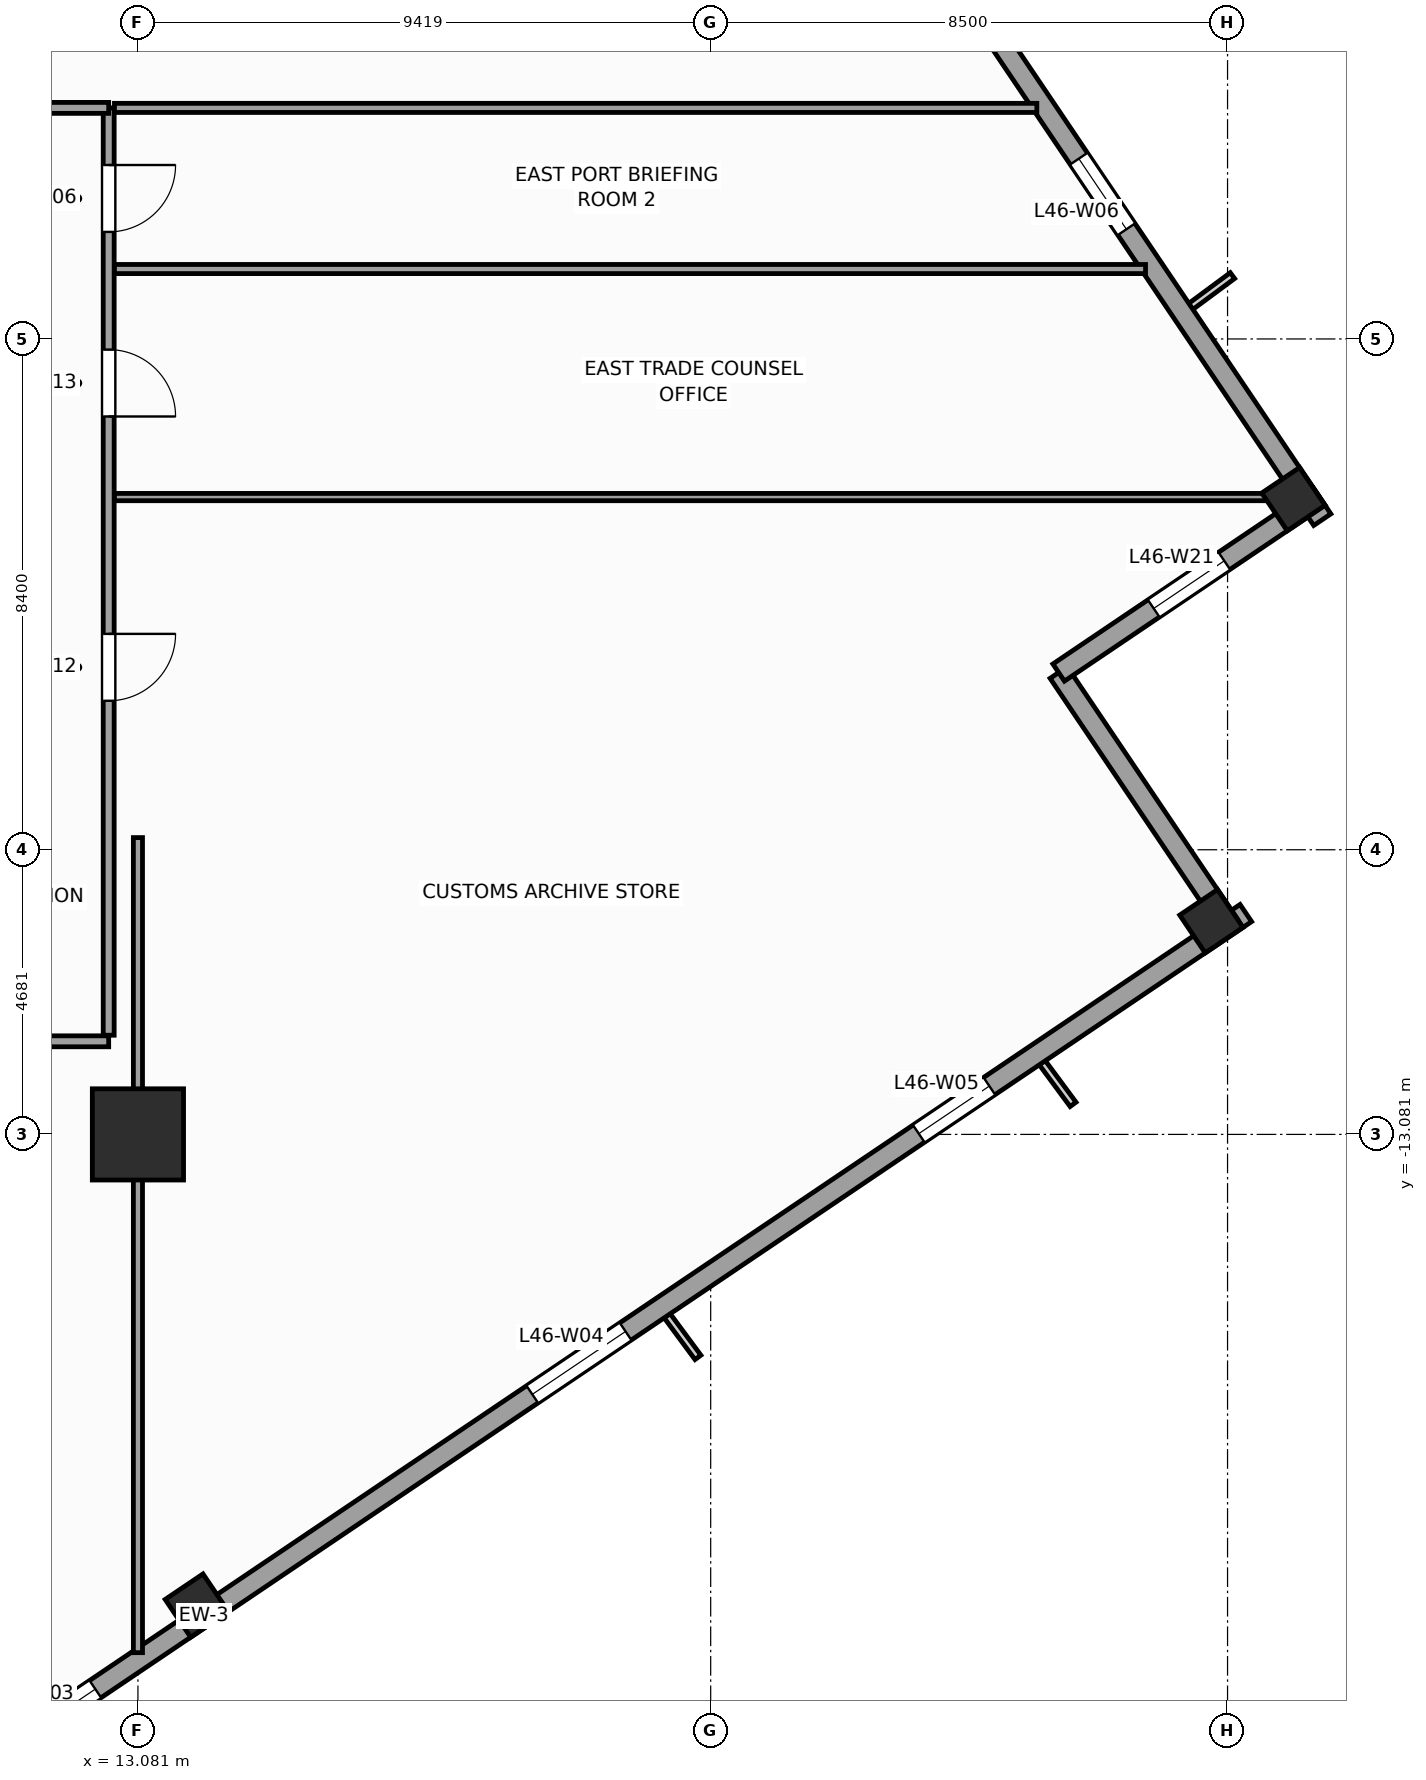
"""IFC4 building model, lengths in metres.
Left out: names, types, materials, properties, quantities, classifications, styles, units other than length and angle.
Written with IfcOpenShell. Run it as: python <this file> out.ifc"""

import sys

from ifc_helpers import new_model, si_unit, direction, frame, frame_2d, origin, origin_2d, place, context, subcontext, project, spatial, rectangle, extrude, source, transform, mapped, element, fill, save


model = new_model("IFC4")
c1 = context("Model", 3, precision=1e-05, world=origin(), true_north=direction((0.0, 1.0)))
c2 = subcontext(c1, "Body", "Model", "MODEL_VIEW")
j1 = project(units=[si_unit("LENGTHUNIT", "METRE"), si_unit("PLANEANGLEUNIT", "RADIAN")], contexts=[c1])
p1 = place(None, origin())
s1 = spatial("IfcSite", under=j1, at=p1, CompositionType="ELEMENT")
p2 = place(p1, origin())
s2 = spatial("IfcBuilding", under=s1, at=p2, CompositionType="ELEMENT")
p3 = place(p2, frame((0.0, 0.0, 192.4)))
s3 = spatial("IfcBuildingStorey", under=s2, at=p3, CompositionType="ELEMENT", Elevation=192.4)
m1 = source(origin(), c2, "Body", "SweptSolid", [
    extrude(rectangle(XDim=1.5, YDim=1.5, at=origin_2d()), origin(), (0.0, 0.0, 1.0), 4.0),
])
p4 = place(p3, frame((13.081, -13.081, 0.0), z_axis=(0.0, 0.0, 1.0), x_axis=(1.0, 0.0, 0.0)))
e1 = element("IfcColumn", 1, at=p4, inside=s3, PredefinedType="COLUMN", context=c2, shape_type="MappedRepresentation", body=[
    mapped(m1, transform((0.0, 0.0, 0.0), scale=1.0)),
])
m2 = source(origin(), c2, "Body", "SweptSolid", [
    extrude(rectangle(XDim=0.75, YDim=0.75, at=origin_2d()), origin(), (0.0, 0.0, 1.0), 4.0),
])
for number, where, z_axis, x_axis in (
    (2, (14.05, -20.83, 0.0), (0.0, 0.0, 1.0), (0.829, 0.559, 0.0)),
    (3, (30.734, -9.576, 0.0), (0.0, 0.0, 1.0), (0.829, 0.559, 0.0)),
    (4, (32.083, -2.635, 0.0), (0.0, 0.0, 1.0), (0.829, 0.559, 0.0)),
):
    element("IfcColumn", number, at=place(p3, frame(where, z_axis=z_axis, x_axis=x_axis)), inside=s3, PredefinedType="COLUMN", context=c2, shape_type="MappedRepresentation", body=[
        mapped(m2, transform((0.0, 0.0, 0.0), scale=1.0)),
    ])
p5 = place(p3, frame((-2.972, -32.558, 0.0), z_axis=(0.0, 0.0, 1.0), x_axis=(0.829036218961, 0.559194910251, 0.0)))
e5 = element("IfcWall", 5, at=p5, inside=s3, PredefinedType="STANDARD", context=c2, shape_type="SweptSolid", body=[
    extrude(rectangle(XDim=41.34, YDim=0.34, at=frame_2d((20.67, 0.0))), origin(), (0.0, 0.0, 1.0), 3.04),
])
p6 = place(p5, frame((4.261, 0.0, 0.56)))
e6 = element("IfcOpeningElement", 6, at=p6, cuts=e5, PredefinedType="OPENING", context=c2, shape_type="SweptSolid", body=[
    extrude(rectangle(XDim=1.4, YDim=2.4, at=frame_2d((0.7, 1.2))), frame((0.0, 0.18, 0.0), z_axis=(0.0, -1.0, 0.0), x_axis=(1.0, 0.0, 0.0)), (0.0, 0.0, 1.0), 0.36),
])
p7 = place(p5, frame((11.064, 0.0, 0.61)))
e7 = element("IfcOpeningElement", 7, at=p7, cuts=e5, PredefinedType="OPENING", context=c2, shape_type="SweptSolid", body=[
    extrude(rectangle(XDim=1.85, YDim=2.35, at=frame_2d((0.925, 1.175))), frame((0.0, 0.18, 0.0), z_axis=(0.0, -1.0, 0.0), x_axis=(1.0, 0.0, 0.0)), (0.0, 0.0, 1.0), 0.36),
])
p8 = place(p5, frame((16.668, 0.0, 0.61)))
e8 = element("IfcOpeningElement", 8, at=p8, cuts=e5, PredefinedType="OPENING", context=c2, shape_type="SweptSolid", body=[
    extrude(rectangle(XDim=1.85, YDim=2.35, at=frame_2d((0.925, 1.175))), frame((0.0, 0.18, 0.0), z_axis=(0.0, -1.0, 0.0), x_axis=(1.0, 0.0, 0.0)), (0.0, 0.0, 1.0), 0.36),
])
p9 = place(p5, frame((27.186, 0.0, 0.61)))
e9 = element("IfcOpeningElement", 9, at=p9, cuts=e5, PredefinedType="OPENING", context=c2, shape_type="SweptSolid", body=[
    extrude(rectangle(XDim=1.85, YDim=2.35, at=frame_2d((0.925, 1.175))), frame((0.0, 0.18, 0.0), z_axis=(0.0, -1.0, 0.0), x_axis=(1.0, 0.0, 0.0)), (0.0, 0.0, 1.0), 0.36),
])
p10 = place(p5, frame((34.852, 0.0, 0.56)))
e10 = element("IfcOpeningElement", 10, at=p10, cuts=e5, PredefinedType="OPENING", context=c2, shape_type="SweptSolid", body=[
    extrude(rectangle(XDim=1.4, YDim=2.4, at=frame_2d((0.7, 1.2))), frame((0.0, 0.18, 0.0), z_axis=(0.0, -1.0, 0.0), x_axis=(1.0, 0.0, 0.0)), (0.0, 0.0, 1.0), 0.36),
])
p11 = place(p3, frame((31.019, -9.631, 0.0), z_axis=(0.0, 0.0, 1.0), x_axis=(-0.559210350234, 0.829025804298, 0.0)))
e11 = element("IfcWall", 11, at=p11, inside=s3, PredefinedType="STANDARD", context=c2, shape_type="SweptSolid", body=[
    extrude(rectangle(XDim=5.0, YDim=0.34, at=frame_2d((2.5, 0.0))), origin(), (0.0, 0.0, 1.0), 3.74),
])
p12 = place(p3, frame((28.223, -5.486, 0.0), z_axis=(0.0, 0.0, 1.0), x_axis=(0.82905227345, 0.559171107879, 0.0)))
e12 = element("IfcWall", 12, at=p12, inside=s3, PredefinedType="STANDARD", context=c2, shape_type="SweptSolid", body=[
    extrude(rectangle(XDim=5.17, YDim=0.34, at=frame_2d((2.585, 0.0))), origin(), (0.0, 0.0, 1.0), 3.04),
])
p13 = place(p12, frame((1.885, 0.0, 0.56)))
e13 = element("IfcOpeningElement", 13, at=p13, cuts=e12, PredefinedType="OPENING", context=c2, shape_type="SweptSolid", body=[
    extrude(rectangle(XDim=1.4, YDim=2.4, at=frame_2d((0.7, 1.2))), frame((0.0, 0.18, 0.0), z_axis=(0.0, -1.0, 0.0), x_axis=(1.0, 0.0, 0.0)), (0.0, 0.0, 1.0), 0.36),
])
p14 = place(p3, frame((32.558, -2.972, 0.0), z_axis=(0.0, 0.0, 1.0), x_axis=(-0.559194910251, 0.829036218961, 0.0)))
e14 = element("IfcWall", 14, at=p14, inside=s3, PredefinedType="STANDARD", context=c2, shape_type="SweptSolid", body=[
    extrude(rectangle(XDim=41.34, YDim=0.34, at=frame_2d((20.67, 0.0))), origin(), (0.0, 0.0, 1.0), 3.04),
])
p15 = place(p14, frame((25.745, 0.0, 0.0)))
e15 = element("IfcOpeningElement", 15, at=p15, cuts=e14, PredefinedType="OPENING", context=c2, shape_type="SweptSolid", body=[
    extrude(rectangle(XDim=1.05, YDim=2.25, at=frame_2d((0.525, 1.125))), frame((0.0, 0.18, 0.0), z_axis=(0.0, -1.0, 0.0), x_axis=(1.0, 0.0, 0.0)), (0.0, 0.0, 1.0), 0.36),
])
p16 = place(p14, frame((5.761, 0.0, 0.56)))
e16 = element("IfcOpeningElement", 16, at=p16, cuts=e14, PredefinedType="OPENING", context=c2, shape_type="SweptSolid", body=[
    extrude(rectangle(XDim=1.4, YDim=2.4, at=frame_2d((0.7, 1.2))), frame((0.0, 0.18, 0.0), z_axis=(0.0, -1.0, 0.0), x_axis=(1.0, 0.0, 0.0)), (0.0, 0.0, 1.0), 0.36),
])
p17 = place(p14, frame((11.064, 0.0, 0.61)))
e17 = element("IfcOpeningElement", 17, at=p17, cuts=e14, PredefinedType="OPENING", context=c2, shape_type="SweptSolid", body=[
    extrude(rectangle(XDim=1.85, YDim=2.35, at=frame_2d((0.925, 1.175))), frame((0.0, 0.18, 0.0), z_axis=(0.0, -1.0, 0.0), x_axis=(1.0, 0.0, 0.0)), (0.0, 0.0, 1.0), 0.36),
])
p18 = place(p14, frame((18.168, 0.0, 0.61)))
e18 = element("IfcOpeningElement", 18, at=p18, cuts=e14, PredefinedType="OPENING", context=c2, shape_type="SweptSolid", body=[
    extrude(rectangle(XDim=1.85, YDim=2.35, at=frame_2d((0.925, 1.175))), frame((0.0, 0.18, 0.0), z_axis=(0.0, -1.0, 0.0), x_axis=(1.0, 0.0, 0.0)), (0.0, 0.0, 1.0), 0.36),
])
p19 = place(p14, frame((27.936, 0.0, 0.61)))
e19 = element("IfcOpeningElement", 19, at=p19, cuts=e14, PredefinedType="OPENING", context=c2, shape_type="SweptSolid", body=[
    extrude(rectangle(XDim=1.85, YDim=2.35, at=frame_2d((0.925, 1.175))), frame((0.0, 0.18, 0.0), z_axis=(0.0, -1.0, 0.0), x_axis=(1.0, 0.0, 0.0)), (0.0, 0.0, 1.0), 0.36),
])
p20 = place(p14, frame((34.852, 0.0, 0.56)))
e20 = element("IfcOpeningElement", 20, at=p20, cuts=e14, PredefinedType="OPENING", context=c2, shape_type="SweptSolid", body=[
    extrude(rectangle(XDim=1.4, YDim=2.4, at=frame_2d((0.7, 1.2))), frame((0.0, 0.18, 0.0), z_axis=(0.0, -1.0, 0.0), x_axis=(1.0, 0.0, 0.0)), (0.0, 0.0, 1.0), 0.36),
])
p21 = place(p3, frame((-12.6, -11.55, 0.0), z_axis=(0.0, 0.0, 1.0), x_axis=(1.0, 0.0, 0.0)))
e21 = element("IfcWall", 21, at=p21, inside=s3, PredefinedType="PARTITIONING", context=c2, shape_type="SweptSolid", body=[
    extrude(rectangle(XDim=25.2, YDim=0.18, at=frame_2d((12.6, 0.0))), origin(), (0.0, 0.0, 1.0), 3.74),
])
p22 = place(p21, frame((3.165, 0.0, 0.0)))
e22 = element("IfcOpeningElement", 22, at=p22, cuts=e21, PredefinedType="OPENING", context=c2, shape_type="SweptSolid", body=[
    extrude(rectangle(XDim=1.1, YDim=2.2, at=frame_2d((0.55, 1.1))), frame((0.0, 0.1, 0.0), z_axis=(0.0, -1.0, 0.0), x_axis=(1.0, 0.0, 0.0)), (0.0, 0.0, 1.0), 0.2),
])
p23 = place(p21, frame((9.3, 0.0, 0.0)))
e23 = element("IfcOpeningElement", 23, at=p23, cuts=e21, PredefinedType="OPENING", context=c2, shape_type="SweptSolid", body=[
    extrude(rectangle(XDim=1.1, YDim=2.2, at=frame_2d((0.55, 1.1))), frame((0.0, 0.1, 0.0), z_axis=(0.0, -1.0, 0.0), x_axis=(1.0, 0.0, 0.0)), (0.0, 0.0, 1.0), 0.2),
])
p24 = place(p21, frame((14.8, 0.0, 0.0)))
e24 = element("IfcOpeningElement", 24, at=p24, cuts=e21, PredefinedType="OPENING", context=c2, shape_type="SweptSolid", body=[
    extrude(rectangle(XDim=1.1, YDim=2.2, at=frame_2d((0.55, 1.1))), frame((0.0, 0.1, 0.0), z_axis=(0.0, -1.0, 0.0), x_axis=(1.0, 0.0, 0.0)), (0.0, 0.0, 1.0), 0.2),
])
p25 = place(p21, frame((20.936, 0.0, 0.0)))
e25 = element("IfcOpeningElement", 25, at=p25, cuts=e21, PredefinedType="OPENING", context=c2, shape_type="SweptSolid", body=[
    extrude(rectangle(XDim=1.1, YDim=2.2, at=frame_2d((0.55, 1.1))), frame((0.0, 0.1, 0.0), z_axis=(0.0, -1.0, 0.0), x_axis=(1.0, 0.0, 0.0)), (0.0, 0.0, 1.0), 0.2),
])
p26 = place(p3, frame((12.6, -11.45, 0.0), z_axis=(0.0, 0.0, 1.0), x_axis=(0.0, 1.0, 0.0)))
e26 = element("IfcWall", 26, at=p26, inside=s3, PredefinedType="PARTITIONING", context=c2, shape_type="SweptSolid", body=[
    extrude(rectangle(XDim=15.25, YDim=0.18, at=frame_2d((7.625, 0.0))), origin(), (0.0, 0.0, 1.0), 3.74),
])
p27 = place(p26, frame((13.21, 0.0, 0.0)))
e27 = element("IfcOpeningElement", 27, at=p27, cuts=e26, PredefinedType="OPENING", context=c2, shape_type="SweptSolid", body=[
    extrude(rectangle(XDim=1.1, YDim=2.2, at=frame_2d((0.55, 1.1))), frame((0.0, 0.1, 0.0), z_axis=(0.0, -1.0, 0.0), x_axis=(1.0, 0.0, 0.0)), (0.0, 0.0, 1.0), 0.2),
])
p28 = place(p26, frame((5.5, 0.0, 0.0)))
e28 = element("IfcOpeningElement", 28, at=p28, cuts=e26, PredefinedType="OPENING", context=c2, shape_type="SweptSolid", body=[
    extrude(rectangle(XDim=1.1, YDim=2.2, at=frame_2d((0.55, 1.1))), frame((0.0, 0.1, 0.0), z_axis=(0.0, -1.0, 0.0), x_axis=(1.0, 0.0, 0.0)), (0.0, 0.0, 1.0), 0.2),
])
p29 = place(p26, frame((10.175, 0.0, 0.0)))
e29 = element("IfcOpeningElement", 29, at=p29, cuts=e26, PredefinedType="OPENING", context=c2, shape_type="SweptSolid", body=[
    extrude(rectangle(XDim=1.1, YDim=2.2, at=frame_2d((0.55, 1.1))), frame((0.0, 0.1, 0.0), z_axis=(0.0, -1.0, 0.0), x_axis=(1.0, 0.0, 0.0)), (0.0, 0.0, 1.0), 0.2),
])
p30 = place(p3, frame((8.7, 3.8, 0.0), z_axis=(0.0, 0.0, 1.0), x_axis=(1.0, 0.0, 0.0)))
e30 = element("IfcWall", 30, at=p30, inside=s3, PredefinedType="PARTITIONING", context=c2, shape_type="SweptSolid", body=[
    extrude(rectangle(XDim=3.9, YDim=0.18, at=frame_2d((1.95, 0.0))), origin(), (0.0, 0.0, 1.0), 3.74),
])
p31 = place(p30, frame((1.4, 0.0, 0.0)))
e31 = element("IfcOpeningElement", 31, at=p31, cuts=e30, PredefinedType="OPENING", context=c2, shape_type="SweptSolid", body=[
    extrude(rectangle(XDim=1.1, YDim=2.2, at=frame_2d((0.55, 1.1))), frame((0.0, 0.1, 0.0), z_axis=(0.0, -1.0, 0.0), x_axis=(1.0, 0.0, 0.0)), (0.0, 0.0, 1.0), 0.2),
])
p32 = place(p3, frame((12.695, 1.15, 0.0), z_axis=(0.0, 0.0, 1.0), x_axis=(1.0, 0.0, 0.0)))
e32 = element("IfcWall", 32, at=p32, inside=s3, PredefinedType="PARTITIONING", context=c2, shape_type="SweptSolid", body=[
    extrude(rectangle(XDim=16.956, YDim=0.15, at=frame_2d((8.478, 0.0))), origin(), (0.0, 0.0, 1.0), 3.74),
])
p33 = place(p3, frame((12.695, 3.8, 0.0), z_axis=(0.0, 0.0, 1.0), x_axis=(1.0, 0.0, 0.0)))
e33 = element("IfcWall", 33, at=p33, inside=s3, PredefinedType="PARTITIONING", context=c2, shape_type="SweptSolid", body=[
    extrude(rectangle(XDim=15.169, YDim=0.15, at=frame_2d((7.584, 0.0))), origin(), (0.0, 0.0, 1.0), 3.74),
])
p34 = place(p3, frame((13.081, -8.2, 0.0), z_axis=(0.0, 0.0, 1.0), x_axis=(0.0, -1.0, 0.0)))
e34 = element("IfcWall", 34, at=p34, inside=s3, PredefinedType="PARTITIONING", context=c2, shape_type="SweptSolid", body=[
    extrude(rectangle(XDim=13.404, YDim=0.15, at=frame_2d((6.702, 0.0))), origin(), (0.0, 0.0, 1.0), 2.84),
])
p35 = place(p3, frame((12.695, -2.6, 0.0), z_axis=(0.0, 0.0, 1.0), x_axis=(1.0, 0.0, 0.0)))
e35 = element("IfcWall", 35, at=p35, inside=s3, PredefinedType="PARTITIONING", context=c2, shape_type="SweptSolid", body=[
    extrude(rectangle(XDim=19.486, YDim=0.12, at=frame_2d((9.743, 0.0))), origin(), (0.0, 0.0, 1.0), 3.74),
])
m3 = source(origin(), c2, "Body", "SweptSolid", [
    extrude(rectangle(XDim=1.85, YDim=2.35, at=frame_2d((0.925, 1.175))), frame((0.0, 0.03, 0.0), z_axis=(0.0, -1.0, 0.0), x_axis=(1.0, 0.0, 0.0)), (0.0, 0.0, 1.0), 0.06),
])
p36 = place(p8, origin())
e36 = element("IfcWindow", 36, at=p36, inside=s3, PartitioningType="SINGLE_PANEL", PredefinedType="WINDOW", context=c2, shape_type="MappedRepresentation", body=[
    mapped(m3, transform((0.0, 0.0, 0.0), scale=1.0)),
])
fill(e8, e36)
p37 = place(p9, origin())
e37 = element("IfcWindow", 37, at=p37, inside=s3, PartitioningType="SINGLE_PANEL", PredefinedType="WINDOW", context=c2, shape_type="MappedRepresentation", body=[
    mapped(m3, transform((0.0, 0.0, 0.0), scale=1.0)),
])
fill(e9, e37)
m4 = source(origin(), c2, "Body", "SweptSolid", [
    extrude(rectangle(XDim=1.4, YDim=2.4, at=frame_2d((0.7, 1.2))), frame((0.0, 0.03, 0.0), z_axis=(0.0, -1.0, 0.0), x_axis=(1.0, 0.0, 0.0)), (0.0, 0.0, 1.0), 0.06),
])
p38 = place(p10, origin())
e38 = element("IfcWindow", 38, at=p38, inside=s3, PartitioningType="SINGLE_PANEL", PredefinedType="WINDOW", context=c2, shape_type="MappedRepresentation", body=[
    mapped(m4, transform((0.0, 0.0, 0.0), scale=1.0)),
])
fill(e10, e38)
p39 = place(p16, origin())
e39 = element("IfcWindow", 39, at=p39, inside=s3, PartitioningType="SINGLE_PANEL", PredefinedType="WINDOW", context=c2, shape_type="MappedRepresentation", body=[
    mapped(m4, transform((0.0, 0.0, 0.0), scale=1.0)),
])
fill(e16, e39)
p40 = place(p13, origin())
e40 = element("IfcWindow", 40, at=p40, inside=s3, PartitioningType="SINGLE_PANEL", PredefinedType="WINDOW", context=c2, shape_type="MappedRepresentation", body=[
    mapped(m4, transform((0.0, 0.0, 0.0), scale=1.0)),
])
fill(e13, e40)
m5 = source(origin(), c2, "Body", "SweptSolid", [
    extrude(rectangle(XDim=1.1, YDim=2.2, at=frame_2d((0.55, 1.1))), frame((0.0, 0.025, 0.0), z_axis=(0.0, -1.0, 0.0), x_axis=(1.0, 0.0, 0.0)), (0.0, 0.0, 1.0), 0.05),
])
p41 = place(p27, frame((1.1, 0.0, 0.0), z_axis=(0.0, 0.0, 1.0), x_axis=(-1.0, 0.0, 0.0)))
e41 = element("IfcDoor", 41, at=p41, inside=s3, OperationType="SINGLE_SWING_RIGHT", PredefinedType="DOOR", context=c2, shape_type="MappedRepresentation", body=[
    mapped(m5, transform((0.0, 0.0, 0.0), scale=1.0)),
])
fill(e27, e41)
p42 = place(p28, frame((1.1, 0.0, 0.0), z_axis=(0.0, 0.0, 1.0), x_axis=(-1.0, 0.0, 0.0)))
e42 = element("IfcDoor", 42, at=p42, inside=s3, OperationType="SINGLE_SWING_RIGHT", PredefinedType="DOOR", context=c2, shape_type="MappedRepresentation", body=[
    mapped(m5, transform((0.0, 0.0, 0.0), scale=1.0)),
])
fill(e28, e42)
p43 = place(p29, frame((1.1, 0.0, 0.0), z_axis=(0.0, 0.0, 1.0), x_axis=(-1.0, 0.0, 0.0)))
e43 = element("IfcDoor", 43, at=p43, inside=s3, OperationType="SINGLE_SWING_LEFT", PredefinedType="DOOR", context=c2, shape_type="MappedRepresentation", body=[
    mapped(m5, transform((0.0, 0.0, 0.0), scale=1.0)),
])
fill(e29, e43)
save(model, sys.argv[1])
